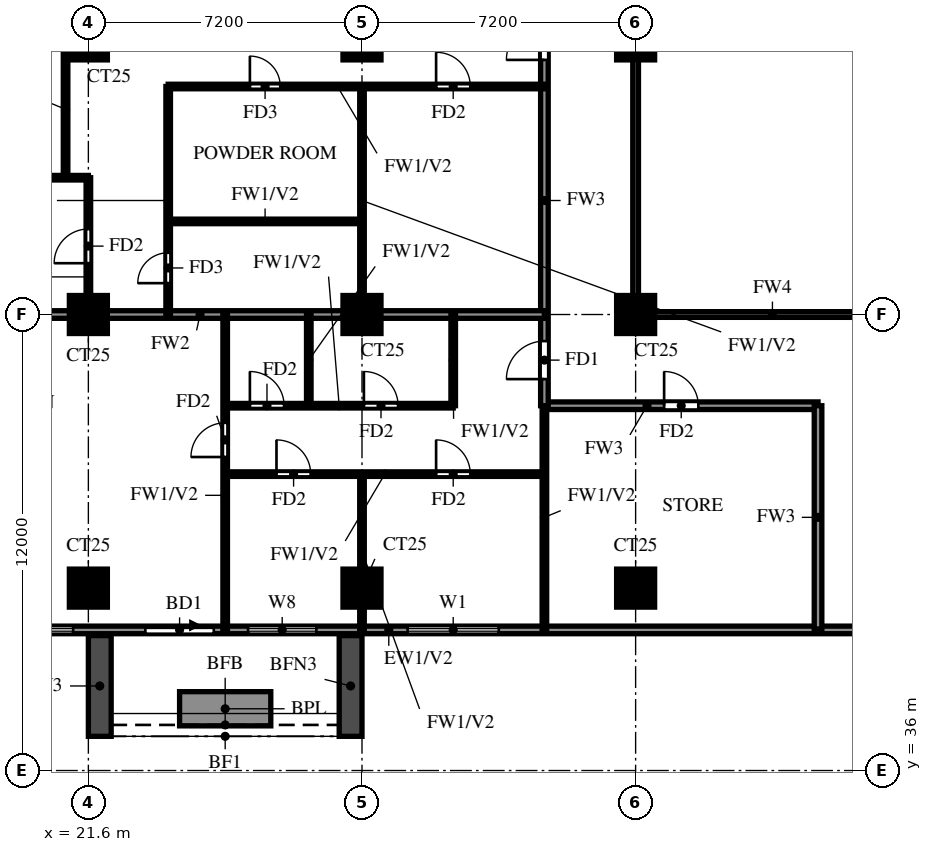
"""IFC4 building model, lengths in metres.
Left out: names, types, materials, properties, quantities, classifications, styles, units other than length and angle.
Written with IfcOpenShell. Run it as: python <this file> out.ifc"""

import sys

from ifc_helpers import new_model, si_unit, direction, frame, frame_2d, origin, origin_2d, place, context, subcontext, project, spatial, rectangle, extrude, source, transform, mapped, element, fill, save


model = new_model("IFC4")
c1 = context("Model", 3, precision=1e-05, world=origin(), true_north=direction((0.0, 1.0)))
c2 = subcontext(c1, "Body", "Model", "MODEL_VIEW")
j1 = project(units=[si_unit("LENGTHUNIT", "METRE"), si_unit("PLANEANGLEUNIT", "RADIAN")], contexts=[c1])
p1 = place(None, origin())
s1 = spatial("IfcSite", under=j1, at=p1, CompositionType="ELEMENT")
p2 = place(p1, origin())
s2 = spatial("IfcBuilding", under=s1, at=p2, CompositionType="ELEMENT")
p3 = place(p2, frame((0.0, 0.0, 167.5)))
s3 = spatial("IfcBuildingStorey", under=s2, at=p3, CompositionType="ELEMENT", Elevation=167.5)
m1 = source(origin(), c2, "Body", "SweptSolid", [
    extrude(rectangle(XDim=1.0, YDim=1.0, at=origin_2d()), origin(), (0.0, 0.0, 1.0), 3.2),
])
for number, where, z_axis, x_axis in (
    (1, (21.6, 40.8, 0.0), (0.0, 0.0, 1.0), (1.0, 0.0, 0.0)),
    (2, (28.8, 40.8, 0.0), (0.0, 0.0, 1.0), (1.0, 0.0, 0.0)),
    (3, (36.0, 40.8, 0.0), (0.0, 0.0, 1.0), (1.0, 0.0, 0.0)),
    (4, (21.6, 48.0, 0.0), (0.0, 0.0, 1.0), (1.0, 0.0, 0.0)),
    (5, (28.8, 48.0, 0.0), (0.0, 0.0, 1.0), (1.0, 0.0, 0.0)),
    (6, (36.0, 48.0, 0.0), (0.0, 0.0, 1.0), (1.0, 0.0, 0.0)),
    (7, (21.6, 55.2, 0.0), (0.0, 0.0, 1.0), (1.0, 0.0, 0.0)),
    (8, (28.8, 55.2, 0.0), (0.0, 0.0, 1.0), (1.0, 0.0, 0.0)),
    (9, (36.0, 55.2, 0.0), (0.0, 0.0, 1.0), (1.0, 0.0, 0.0)),
):
    element("IfcColumn", number, at=place(p3, frame(where, z_axis=z_axis, x_axis=x_axis)), inside=s3, PredefinedType="COLUMN", context=c2, shape_type="MappedRepresentation", body=[
        mapped(m1, transform((0.0, 0.0, 0.0))),
    ])
p4 = place(p3, frame((18.2, 39.7, 0.0), z_axis=(0.0, 0.0, 1.0), x_axis=(1.0, 0.0, 0.0)))
e10 = element("IfcWall", 10, at=p4, inside=s3, PredefinedType="SOLIDWALL", context=c2, shape_type="SweptSolid", body=[
    extrude(rectangle(XDim=23.8, YDim=0.2, at=frame_2d((11.9, 0.0))), origin(), (0.0, 0.0, 1.0), 3.2),
])
p5 = place(p4, frame((4.9, 0.0, 0.0)))
e11 = element("IfcOpeningElement", 11, at=p5, cuts=e10, PredefinedType="OPENING", context=c2, shape_type="SweptSolid", body=[
    extrude(rectangle(XDim=1.8, YDim=2.4, at=frame_2d((0.9, 1.2))), frame((0.0, 0.11, 0.0), z_axis=(0.0, -1.0, 0.0), x_axis=(1.0, 0.0, 0.0)), (0.0, 0.0, 1.0), 0.22),
])
p6 = place(p4, frame((0.6, 0.0, 0.6)))
e12 = element("IfcOpeningElement", 12, at=p6, cuts=e10, PredefinedType="OPENING", context=c2, shape_type="SweptSolid", body=[
    extrude(rectangle(XDim=2.4, YDim=2.4, at=frame_2d((1.2, 1.2))), frame((0.0, 0.11, 0.0), z_axis=(0.0, -1.0, 0.0), x_axis=(1.0, 0.0, 0.0)), (0.0, 0.0, 1.0), 0.22),
])
p7 = place(p4, frame((7.6, 0.0, 0.6)))
e13 = element("IfcOpeningElement", 13, at=p7, cuts=e10, PredefinedType="OPENING", context=c2, shape_type="SweptSolid", body=[
    extrude(rectangle(XDim=1.8, YDim=2.4, at=frame_2d((0.9, 1.2))), frame((0.0, 0.11, 0.0), z_axis=(0.0, -1.0, 0.0), x_axis=(1.0, 0.0, 0.0)), (0.0, 0.0, 1.0), 0.22),
])
p8 = place(p4, frame((11.8, 0.0, 0.6)))
e14 = element("IfcOpeningElement", 14, at=p8, cuts=e10, PredefinedType="OPENING", context=c2, shape_type="SweptSolid", body=[
    extrude(rectangle(XDim=2.4, YDim=2.4, at=frame_2d((1.2, 1.2))), frame((0.0, 0.11, 0.0), z_axis=(0.0, -1.0, 0.0), x_axis=(1.0, 0.0, 0.0)), (0.0, 0.0, 1.0), 0.22),
])
for number, where, z_axis, x_axis in (
    (15, (21.9, 39.55, 0.0), (0.0, 0.0, 1.0), (0.0, -1.0, 0.0)),
    (16, (28.5, 39.55, 0.0), (0.0, 0.0, 1.0), (0.0, -1.0, 0.0)),
):
    element("IfcWall", number, at=place(p3, frame(where, z_axis=z_axis, x_axis=x_axis)), inside=s3, PredefinedType="SOLIDWALL", context=c2, shape_type="SweptSolid", body=[
        extrude(rectangle(XDim=2.65, YDim=0.6, at=frame_2d((1.325, 0.0))), origin(), (0.0, 0.0, 1.0), 2.85),
    ])
p9 = place(p3, frame((24.0, 37.625, 0.0), z_axis=(0.0, 0.0, 1.0), x_axis=(1.0, 0.0, 0.0)))
e17 = element("IfcWall", 17, at=p9, inside=s3, PredefinedType="SOLIDWALL", context=c2, shape_type="SweptSolid", body=[
    extrude(rectangle(XDim=2.4, YDim=0.9, at=frame_2d((1.2, 0.0))), origin(), (0.0, 0.0, 1.0), 0.9),
])
p10 = place(p3, frame((33.6, 45.6, 0.0), z_axis=(0.0, 0.0, 1.0), x_axis=(1.0, 0.0, 0.0)))
e18 = element("IfcWall", 18, at=p10, inside=s3, PredefinedType="SOLIDWALL", context=c2, shape_type="SweptSolid", body=[
    extrude(rectangle(XDim=7.2, YDim=0.2, at=frame_2d((3.6, 0.0))), origin(), (0.0, 0.0, 1.0), 3.2),
])
p11 = place(p10, frame((3.15, 0.0, 0.0)))
e19 = element("IfcOpeningElement", 19, at=p11, cuts=e18, PredefinedType="OPENING", context=c2, shape_type="SweptSolid", body=[
    extrude(rectangle(XDim=0.9, YDim=2.1, at=frame_2d((0.45, 1.05))), frame((0.0, 0.11, 0.0), z_axis=(0.0, -1.0, 0.0), x_axis=(1.0, 0.0, 0.0)), (0.0, 0.0, 1.0), 0.22),
])
p12 = place(p3, frame((33.6, 45.6, 0.0), z_axis=(0.0, 0.0, 1.0), x_axis=(0.0, 1.0, 0.0)))
e20 = element("IfcWall", 20, at=p12, inside=s3, PredefinedType="SOLIDWALL", context=c2, shape_type="SweptSolid", body=[
    extrude(rectangle(XDim=10.8, YDim=0.2, at=frame_2d((5.4, 0.0))), origin(), (0.0, 0.0, 1.0), 3.2),
])
p13 = place(p12, frame((0.7, 0.0, 0.0)))
e21 = element("IfcOpeningElement", 21, at=p13, cuts=e20, PredefinedType="OPENING", context=c2, shape_type="SweptSolid", body=[
    extrude(rectangle(XDim=1.0, YDim=2.1, at=frame_2d((0.5, 1.05))), frame((0.0, 0.11, 0.0), z_axis=(0.0, -1.0, 0.0), x_axis=(1.0, 0.0, 0.0)), (0.0, 0.0, 1.0), 0.22),
])
p14 = place(p12, frame((9.1, 0.0, 0.0)))
e22 = element("IfcOpeningElement", 22, at=p14, cuts=e20, PredefinedType="OPENING", context=c2, shape_type="SweptSolid", body=[
    extrude(rectangle(XDim=1.0, YDim=2.1, at=frame_2d((0.5, 1.05))), frame((0.0, 0.11, 0.0), z_axis=(0.0, -1.0, 0.0), x_axis=(1.0, 0.0, 0.0)), (0.0, 0.0, 1.0), 0.22),
])
p15 = place(p3, frame((40.8, 39.725, 0.0), z_axis=(0.0, 0.0, 1.0), x_axis=(0.0, 1.0, 0.0)))
e23 = element("IfcWall", 23, at=p15, inside=s3, PredefinedType="SOLIDWALL", context=c2, shape_type="SweptSolid", body=[
    extrude(rectangle(XDim=5.875, YDim=0.2, at=frame_2d((2.938, 0.0))), origin(), (0.0, 0.0, 1.0), 3.2),
])
p16 = place(p3, frame((14.525, 48.0, 0.0), z_axis=(0.0, 0.0, 1.0), x_axis=(1.0, 0.0, 0.0)))
e24 = element("IfcWall", 24, at=p16, inside=s3, PredefinedType="SOLIDWALL", context=c2, shape_type="SweptSolid", body=[
    extrude(rectangle(XDim=19.075, YDim=0.2, at=frame_2d((9.538, 0.0))), origin(), (0.0, 0.0, 1.0), 3.2),
])
p17 = place(p3, frame((25.2, 43.8, 0.0), z_axis=(0.0, 0.0, 1.0), x_axis=(1.0, 0.0, 0.0)))
e25 = element("IfcWall", 25, at=p17, inside=s3, PredefinedType="PARTITIONING", context=c2, shape_type="SweptSolid", body=[
    extrude(rectangle(XDim=8.4, YDim=0.12, at=frame_2d((4.2, 0.0))), origin(), (0.0, 0.0, 1.0), 3.2),
])
p18 = place(p17, frame((1.35, 0.0, 0.0)))
e26 = element("IfcOpeningElement", 26, at=p18, cuts=e25, PredefinedType="OPENING", context=c2, shape_type="SweptSolid", body=[
    extrude(rectangle(XDim=0.9, YDim=2.1, at=frame_2d((0.45, 1.05))), frame((0.0, 0.07, 0.0), z_axis=(0.0, -1.0, 0.0), x_axis=(1.0, 0.0, 0.0)), (0.0, 0.0, 1.0), 0.14),
])
p19 = place(p17, frame((5.55, 0.0, 0.0)))
e27 = element("IfcOpeningElement", 27, at=p19, cuts=e25, PredefinedType="OPENING", context=c2, shape_type="SweptSolid", body=[
    extrude(rectangle(XDim=0.9, YDim=2.1, at=frame_2d((0.45, 1.05))), frame((0.0, 0.07, 0.0), z_axis=(0.0, -1.0, 0.0), x_axis=(1.0, 0.0, 0.0)), (0.0, 0.0, 1.0), 0.14),
])
p20 = place(p3, frame((25.2, 45.6, 0.0), z_axis=(0.0, 0.0, 1.0), x_axis=(1.0, 0.0, 0.0)))
e28 = element("IfcWall", 28, at=p20, inside=s3, PredefinedType="PARTITIONING", context=c2, shape_type="SweptSolid", body=[
    extrude(rectangle(XDim=6.0, YDim=0.12, at=frame_2d((3.0, 0.0))), origin(), (0.0, 0.0, 1.0), 3.2),
])
p21 = place(p20, frame((0.65, 0.0, 0.0)))
e29 = element("IfcOpeningElement", 29, at=p21, cuts=e28, PredefinedType="OPENING", context=c2, shape_type="SweptSolid", body=[
    extrude(rectangle(XDim=0.9, YDim=2.1, at=frame_2d((0.45, 1.05))), frame((0.0, 0.07, 0.0), z_axis=(0.0, -1.0, 0.0), x_axis=(1.0, 0.0, 0.0)), (0.0, 0.0, 1.0), 0.14),
])
p22 = place(p20, frame((3.65, 0.0, 0.0)))
e30 = element("IfcOpeningElement", 30, at=p22, cuts=e28, PredefinedType="OPENING", context=c2, shape_type="SweptSolid", body=[
    extrude(rectangle(XDim=0.9, YDim=2.1, at=frame_2d((0.45, 1.05))), frame((0.0, 0.07, 0.0), z_axis=(0.0, -1.0, 0.0), x_axis=(1.0, 0.0, 0.0)), (0.0, 0.0, 1.0), 0.14),
])
p23 = place(p3, frame((23.7, 50.45, 0.0), z_axis=(0.0, 0.0, 1.0), x_axis=(1.0, 0.0, 0.0)))
e31 = element("IfcWall", 31, at=p23, inside=s3, PredefinedType="PARTITIONING", context=c2, shape_type="SweptSolid", body=[
    extrude(rectangle(XDim=5.1, YDim=0.12, at=frame_2d((2.55, 0.0))), origin(), (0.0, 0.0, 1.0), 3.2),
])
p24 = place(p3, frame((14.525, 51.6, 0.0), z_axis=(0.0, 0.0, 1.0), x_axis=(1.0, 0.0, 0.0)))
e32 = element("IfcWall", 32, at=p24, inside=s3, PredefinedType="PARTITIONING", context=c2, shape_type="SweptSolid", body=[
    extrude(rectangle(XDim=7.075, YDim=0.12, at=frame_2d((3.538, 0.0))), origin(), (0.0, 0.0, 1.0), 2.3),
])
p25 = place(p24, frame((2.837, 0.0, 0.0)))
e33 = element("IfcOpeningElement", 33, at=p25, cuts=e32, PredefinedType="OPENING", context=c2, shape_type="SweptSolid", body=[
    extrude(rectangle(XDim=0.8, YDim=2.1, at=frame_2d((0.4, 1.05))), frame((0.0, 0.07, 0.0), z_axis=(0.0, -1.0, 0.0), x_axis=(1.0, 0.0, 0.0)), (0.0, 0.0, 1.0), 0.14),
])
p26 = place(p3, frame((23.7, 54.0, 0.0), z_axis=(0.0, 0.0, 1.0), x_axis=(1.0, 0.0, 0.0)))
e34 = element("IfcWall", 34, at=p26, inside=s3, PredefinedType="PARTITIONING", context=c2, shape_type="SweptSolid", body=[
    extrude(rectangle(XDim=9.9, YDim=0.12, at=frame_2d((4.95, 0.0))), origin(), (0.0, 0.0, 1.0), 3.2),
])
p27 = place(p26, frame((2.15, 0.0, 0.0)))
e35 = element("IfcOpeningElement", 35, at=p27, cuts=e34, PredefinedType="OPENING", context=c2, shape_type="SweptSolid", body=[
    extrude(rectangle(XDim=0.8, YDim=2.1, at=frame_2d((0.4, 1.05))), frame((0.0, 0.07, 0.0), z_axis=(0.0, -1.0, 0.0), x_axis=(1.0, 0.0, 0.0)), (0.0, 0.0, 1.0), 0.14),
])
p28 = place(p26, frame((7.05, 0.0, 0.0)))
e36 = element("IfcOpeningElement", 36, at=p28, cuts=e34, PredefinedType="OPENING", context=c2, shape_type="SweptSolid", body=[
    extrude(rectangle(XDim=0.9, YDim=2.1, at=frame_2d((0.45, 1.05))), frame((0.0, 0.07, 0.0), z_axis=(0.0, -1.0, 0.0), x_axis=(1.0, 0.0, 0.0)), (0.0, 0.0, 1.0), 0.14),
])
p29 = place(p3, frame((21.0, 51.6, 0.0), z_axis=(0.0, 0.0, 1.0), x_axis=(0.0, 1.0, 0.0)))
e37 = element("IfcWall", 37, at=p29, inside=s3, PredefinedType="PARTITIONING", context=c2, shape_type="SweptSolid", body=[
    extrude(rectangle(XDim=3.6, YDim=0.12, at=frame_2d((1.8, 0.0))), origin(), (0.0, 0.0, 1.0), 3.2),
])
p30 = place(p3, frame((21.6, 48.0, 0.0), z_axis=(0.0, 0.0, 1.0), x_axis=(0.0, 1.0, 0.0)))
e38 = element("IfcWall", 38, at=p30, inside=s3, PredefinedType="PARTITIONING", context=c2, shape_type="SweptSolid", body=[
    extrude(rectangle(XDim=3.6, YDim=0.12, at=frame_2d((1.8, 0.0))), origin(), (0.0, 0.0, 1.0), 3.2),
])
p31 = place(p30, frame((1.35, 0.0, 0.0)))
e39 = element("IfcOpeningElement", 39, at=p31, cuts=e38, PredefinedType="OPENING", context=c2, shape_type="SweptSolid", body=[
    extrude(rectangle(XDim=0.9, YDim=2.1, at=frame_2d((0.45, 1.05))), frame((0.0, 0.07, 0.0), z_axis=(0.0, -1.0, 0.0), x_axis=(1.0, 0.0, 0.0)), (0.0, 0.0, 1.0), 0.14),
])
p32 = place(p3, frame((23.7, 48.0, 0.0), z_axis=(0.0, 0.0, 1.0), x_axis=(0.0, 1.0, 0.0)))
e40 = element("IfcWall", 40, at=p32, inside=s3, PredefinedType="PARTITIONING", context=c2, shape_type="SweptSolid", body=[
    extrude(rectangle(XDim=6.0, YDim=0.12, at=frame_2d((3.0, 0.0))), origin(), (0.0, 0.0, 1.0), 3.2),
])
p33 = place(p32, frame((0.825, 0.0, 0.0)))
e41 = element("IfcOpeningElement", 41, at=p33, cuts=e40, PredefinedType="OPENING", context=c2, shape_type="SweptSolid", body=[
    extrude(rectangle(XDim=0.8, YDim=2.1, at=frame_2d((0.4, 1.05))), frame((0.0, 0.07, 0.0), z_axis=(0.0, -1.0, 0.0), x_axis=(1.0, 0.0, 0.0)), (0.0, 0.0, 1.0), 0.14),
])
p34 = place(p3, frame((25.2, 39.725, 0.0), z_axis=(0.0, 0.0, 1.0), x_axis=(0.0, 1.0, 0.0)))
e42 = element("IfcWall", 42, at=p34, inside=s3, PredefinedType="PARTITIONING", context=c2, shape_type="SweptSolid", body=[
    extrude(rectangle(XDim=8.275, YDim=0.12, at=frame_2d((4.137, 0.0))), origin(), (0.0, 0.0, 1.0), 3.2),
])
p35 = place(p34, frame((4.525, 0.0, 0.0)))
e43 = element("IfcOpeningElement", 43, at=p35, cuts=e42, PredefinedType="OPENING", context=c2, shape_type="SweptSolid", body=[
    extrude(rectangle(XDim=0.9, YDim=2.1, at=frame_2d((0.45, 1.05))), frame((0.0, 0.07, 0.0), z_axis=(0.0, -1.0, 0.0), x_axis=(1.0, 0.0, 0.0)), (0.0, 0.0, 1.0), 0.14),
])
p36 = place(p3, frame((27.4, 45.6, 0.0), z_axis=(0.0, 0.0, 1.0), x_axis=(0.0, 1.0, 0.0)))
e44 = element("IfcWall", 44, at=p36, inside=s3, PredefinedType="PARTITIONING", context=c2, shape_type="SweptSolid", body=[
    extrude(rectangle(XDim=2.4, YDim=0.12, at=frame_2d((1.2, 0.0))), origin(), (0.0, 0.0, 1.0), 3.2),
])
p37 = place(p3, frame((28.8, 39.725, 0.0), z_axis=(0.0, 0.0, 1.0), x_axis=(0.0, 1.0, 0.0)))
e45 = element("IfcWall", 45, at=p37, inside=s3, PredefinedType="PARTITIONING", context=c2, shape_type="SweptSolid", body=[
    extrude(rectangle(XDim=4.075, YDim=0.12, at=frame_2d((2.038, 0.0))), origin(), (0.0, 0.0, 1.0), 3.2),
])
p38 = place(p3, frame((28.8, 48.0, 0.0), z_axis=(0.0, 0.0, 1.0), x_axis=(0.0, 1.0, 0.0)))
e46 = element("IfcWall", 46, at=p38, inside=s3, PredefinedType="PARTITIONING", context=c2, shape_type="SweptSolid", body=[
    extrude(rectangle(XDim=6.0, YDim=0.12, at=frame_2d((3.0, 0.0))), origin(), (0.0, 0.0, 1.0), 3.2),
])
p39 = place(p3, frame((31.2, 45.6, 0.0), z_axis=(0.0, 0.0, 1.0), x_axis=(0.0, 1.0, 0.0)))
e47 = element("IfcWall", 47, at=p39, inside=s3, PredefinedType="PARTITIONING", context=c2, shape_type="SweptSolid", body=[
    extrude(rectangle(XDim=2.4, YDim=0.12, at=frame_2d((1.2, 0.0))), origin(), (0.0, 0.0, 1.0), 3.2),
])
p40 = place(p3, frame((33.6, 39.725, 0.0), z_axis=(0.0, 0.0, 1.0), x_axis=(0.0, 1.0, 0.0)))
e48 = element("IfcWall", 48, at=p40, inside=s3, PredefinedType="PARTITIONING", context=c2, shape_type="SweptSolid", body=[
    extrude(rectangle(XDim=5.875, YDim=0.12, at=frame_2d((2.938, 0.0))), origin(), (0.0, 0.0, 1.0), 3.2),
])
p41 = place(p3, frame((36.0, 48.0, 0.0), z_axis=(0.0, 0.0, 1.0), x_axis=(1.0, 0.0, 0.0)))
e49 = element("IfcWall", 49, at=p41, inside=s3, PredefinedType="SOLIDWALL", context=c2, shape_type="SweptSolid", body=[
    extrude(rectangle(XDim=7.2, YDim=0.15, at=frame_2d((3.6, 0.0))), origin(), (0.0, 0.0, 1.0), 2.3),
])
p42 = place(p3, frame((36.0, 48.0, 0.0), z_axis=(0.0, 0.0, 1.0), x_axis=(0.0, 1.0, 0.0)))
e50 = element("IfcWall", 50, at=p42, inside=s3, PredefinedType="SOLIDWALL", context=c2, shape_type="SweptSolid", body=[
    extrude(rectangle(XDim=14.4, YDim=0.15, at=frame_2d((7.2, 0.0))), origin(), (0.0, 0.0, 1.0), 2.3),
])
p43 = place(p5, origin())
e51 = element("IfcDoor", 51, at=p43, inside=s3, OperationType="DOUBLE_DOOR_SLIDING", PredefinedType="DOOR", context=c2, shape_type="SweptSolid", body=[
    extrude(rectangle(XDim=1.8, YDim=2.4, at=frame_2d((0.9, 1.2))), frame((0.0, 0.025, 0.0), z_axis=(0.0, -1.0, 0.0), x_axis=(1.0, 0.0, 0.0)), (0.0, 0.0, 1.0), 0.05),
])
fill(e11, e51)
p44 = place(p6, origin())
e52 = element("IfcWindow", 52, at=p44, inside=s3, PartitioningType="DOUBLE_PANEL_VERTICAL", PredefinedType="WINDOW", context=c2, shape_type="SweptSolid", body=[
    extrude(rectangle(XDim=2.4, YDim=2.4, at=frame_2d((1.2, 1.2))), frame((0.0, 0.03, 0.0), z_axis=(0.0, -1.0, 0.0), x_axis=(1.0, 0.0, 0.0)), (0.0, 0.0, 1.0), 0.06),
])
fill(e12, e52)
p45 = place(p7, origin())
e53 = element("IfcWindow", 53, at=p45, inside=s3, PartitioningType="DOUBLE_PANEL_VERTICAL", PredefinedType="WINDOW", context=c2, shape_type="SweptSolid", body=[
    extrude(rectangle(XDim=1.8, YDim=2.4, at=frame_2d((0.9, 1.2))), frame((0.0, 0.03, 0.0), z_axis=(0.0, -1.0, 0.0), x_axis=(1.0, 0.0, 0.0)), (0.0, 0.0, 1.0), 0.06),
])
fill(e13, e53)
p46 = place(p8, origin())
e54 = element("IfcWindow", 54, at=p46, inside=s3, PartitioningType="DOUBLE_PANEL_VERTICAL", PredefinedType="WINDOW", context=c2, shape_type="SweptSolid", body=[
    extrude(rectangle(XDim=2.4, YDim=2.4, at=frame_2d((1.2, 1.2))), frame((0.0, 0.03, 0.0), z_axis=(0.0, -1.0, 0.0), x_axis=(1.0, 0.0, 0.0)), (0.0, 0.0, 1.0), 0.06),
])
fill(e14, e54)
p47 = place(p13, origin())
e55 = element("IfcDoor", 55, at=p47, inside=s3, OperationType="SINGLE_SWING_LEFT", PredefinedType="DOOR", context=c2, shape_type="SweptSolid", body=[
    extrude(rectangle(XDim=1.0, YDim=2.1, at=frame_2d((0.5, 1.05))), frame((0.0, 0.025, 0.0), z_axis=(0.0, -1.0, 0.0), x_axis=(1.0, 0.0, 0.0)), (0.0, 0.0, 1.0), 0.05),
])
fill(e21, e55)
p48 = place(p35, origin())
e56 = element("IfcDoor", 56, at=p48, inside=s3, OperationType="SINGLE_SWING_RIGHT", PredefinedType="DOOR", context=c2, shape_type="SweptSolid", body=[
    extrude(rectangle(XDim=0.9, YDim=2.1, at=frame_2d((0.45, 1.05))), frame((0.0, 0.025, 0.0), z_axis=(0.0, -1.0, 0.0), x_axis=(1.0, 0.0, 0.0)), (0.0, 0.0, 1.0), 0.05),
])
fill(e43, e56)
p49 = place(p18, origin())
e57 = element("IfcDoor", 57, at=p49, inside=s3, OperationType="SINGLE_SWING_LEFT", PredefinedType="DOOR", context=c2, shape_type="SweptSolid", body=[
    extrude(rectangle(XDim=0.9, YDim=2.1, at=frame_2d((0.45, 1.05))), frame((0.0, 0.025, 0.0), z_axis=(0.0, -1.0, 0.0), x_axis=(1.0, 0.0, 0.0)), (0.0, 0.0, 1.0), 0.05),
])
fill(e26, e57)
p50 = place(p19, origin())
e58 = element("IfcDoor", 58, at=p50, inside=s3, OperationType="SINGLE_SWING_LEFT", PredefinedType="DOOR", context=c2, shape_type="SweptSolid", body=[
    extrude(rectangle(XDim=0.9, YDim=2.1, at=frame_2d((0.45, 1.05))), frame((0.0, 0.025, 0.0), z_axis=(0.0, -1.0, 0.0), x_axis=(1.0, 0.0, 0.0)), (0.0, 0.0, 1.0), 0.05),
])
fill(e27, e58)
p51 = place(p21, origin())
e59 = element("IfcDoor", 59, at=p51, inside=s3, OperationType="SINGLE_SWING_RIGHT", PredefinedType="DOOR", context=c2, shape_type="SweptSolid", body=[
    extrude(rectangle(XDim=0.9, YDim=2.1, at=frame_2d((0.45, 1.05))), frame((0.0, 0.025, 0.0), z_axis=(0.0, -1.0, 0.0), x_axis=(1.0, 0.0, 0.0)), (0.0, 0.0, 1.0), 0.05),
])
fill(e29, e59)
p52 = place(p22, origin())
e60 = element("IfcDoor", 60, at=p52, inside=s3, OperationType="SINGLE_SWING_LEFT", PredefinedType="DOOR", context=c2, shape_type="SweptSolid", body=[
    extrude(rectangle(XDim=0.9, YDim=2.1, at=frame_2d((0.45, 1.05))), frame((0.0, 0.025, 0.0), z_axis=(0.0, -1.0, 0.0), x_axis=(1.0, 0.0, 0.0)), (0.0, 0.0, 1.0), 0.05),
])
fill(e30, e60)
p53 = place(p11, origin())
e61 = element("IfcDoor", 61, at=p53, inside=s3, OperationType="SINGLE_SWING_LEFT", PredefinedType="DOOR", context=c2, shape_type="SweptSolid", body=[
    extrude(rectangle(XDim=0.9, YDim=2.1, at=frame_2d((0.45, 1.05))), frame((0.0, 0.025, 0.0), z_axis=(0.0, -1.0, 0.0), x_axis=(1.0, 0.0, 0.0)), (0.0, 0.0, 1.0), 0.05),
])
fill(e19, e61)
p54 = place(p14, origin())
e62 = element("IfcDoor", 62, at=p54, inside=s3, OperationType="SINGLE_SWING_RIGHT", PredefinedType="DOOR", context=c2, shape_type="SweptSolid", body=[
    extrude(rectangle(XDim=1.0, YDim=2.1, at=frame_2d((0.5, 1.05))), frame((0.0, 0.025, 0.0), z_axis=(0.0, -1.0, 0.0), x_axis=(1.0, 0.0, 0.0)), (0.0, 0.0, 1.0), 0.05),
])
fill(e22, e62)
p55 = place(p31, origin())
e63 = element("IfcDoor", 63, at=p55, inside=s3, OperationType="SINGLE_SWING_LEFT", PredefinedType="DOOR", context=c2, shape_type="SweptSolid", body=[
    extrude(rectangle(XDim=0.9, YDim=2.1, at=frame_2d((0.45, 1.05))), frame((0.0, 0.025, 0.0), z_axis=(0.0, -1.0, 0.0), x_axis=(1.0, 0.0, 0.0)), (0.0, 0.0, 1.0), 0.05),
])
fill(e39, e63)
p56 = place(p33, origin())
e64 = element("IfcDoor", 64, at=p56, inside=s3, OperationType="SINGLE_SWING_LEFT", PredefinedType="DOOR", context=c2, shape_type="SweptSolid", body=[
    extrude(rectangle(XDim=0.8, YDim=2.1, at=frame_2d((0.4, 1.05))), frame((0.0, 0.025, 0.0), z_axis=(0.0, -1.0, 0.0), x_axis=(1.0, 0.0, 0.0)), (0.0, 0.0, 1.0), 0.05),
])
fill(e41, e64)
p57 = place(p27, origin())
e65 = element("IfcDoor", 65, at=p57, inside=s3, OperationType="SINGLE_SWING_LEFT", PredefinedType="DOOR", context=c2, shape_type="SweptSolid", body=[
    extrude(rectangle(XDim=0.8, YDim=2.1, at=frame_2d((0.4, 1.05))), frame((0.0, 0.025, 0.0), z_axis=(0.0, -1.0, 0.0), x_axis=(1.0, 0.0, 0.0)), (0.0, 0.0, 1.0), 0.05),
])
fill(e35, e65)
p58 = place(p28, origin())
e66 = element("IfcDoor", 66, at=p58, inside=s3, OperationType="SINGLE_SWING_LEFT", PredefinedType="DOOR", context=c2, shape_type="SweptSolid", body=[
    extrude(rectangle(XDim=0.9, YDim=2.1, at=frame_2d((0.45, 1.05))), frame((0.0, 0.025, 0.0), z_axis=(0.0, -1.0, 0.0), x_axis=(1.0, 0.0, 0.0)), (0.0, 0.0, 1.0), 0.05),
])
fill(e36, e66)
save(model, sys.argv[1])
